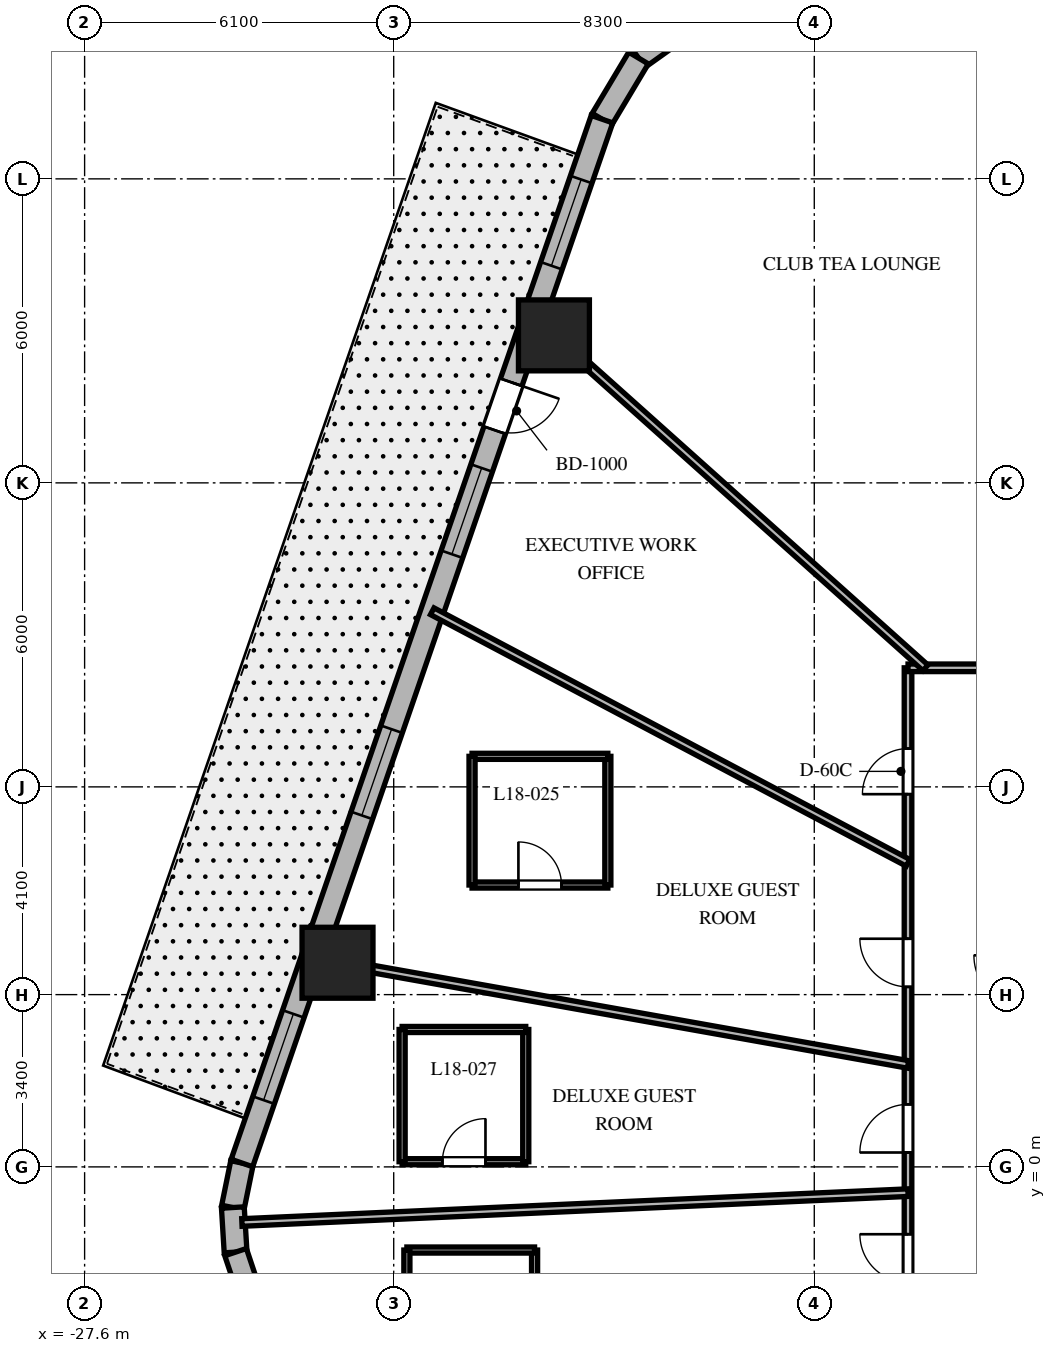
"""IFC4 building model, lengths in metres.
Left out: names, types, materials, properties, quantities, classifications, styles, units other than length and angle.
Written with IfcOpenShell. Run it as: python <this file> out.ifc"""

import sys

from ifc_helpers import new_model, si_unit, direction, frame, frame_2d, origin, origin_2d, place, context, subcontext, project, spatial, rectangle, extrude, element, fill, save


model = new_model("IFC4")
c1 = context("Model", 3, precision=1e-05, world=origin(), true_north=direction((0.0, 1.0)))
c2 = subcontext(c1, "Body", "Model", "MODEL_VIEW")
j1 = project(units=[si_unit("LENGTHUNIT", "METRE"), si_unit("PLANEANGLEUNIT", "RADIAN")], contexts=[c1])
p1 = place(None, origin())
s1 = spatial("IfcSite", under=j1, at=p1, CompositionType="ELEMENT")
p2 = place(p1, origin())
s2 = spatial("IfcBuilding", under=s1, at=p2, CompositionType="ELEMENT")
p3 = place(p2, frame((0.0, 0.0, 78.6)))
s3 = spatial("IfcBuildingStorey", under=s2, at=p3, CompositionType="ELEMENT", Elevation=78.6)
for number, where, z_axis, x_axis in (
    (1, (-18.338, 16.411, 0.0), (0.0, 0.0, 1.0), (1.0, 0.0, 0.0)),
    (2, (-22.609, 4.029, 0.0), (0.0, 0.0, 1.0), (1.0, 0.0, 0.0)),
):
    element("IfcColumn", number, at=place(p3, frame(where, z_axis=z_axis, x_axis=x_axis)), inside=s3, PredefinedType="COLUMN", context=c2, shape_type="SweptSolid", body=[
        extrude(rectangle(XDim=1.4, YDim=1.4, at=origin_2d()), origin(), (0.0, 0.0, 1.0), 3.7),
    ])
p4 = place(p3, frame((-15.544, 22.687, 0.0), z_axis=(0.0, 0.0, 1.0), x_axis=(-0.814210854316, -0.580569276412, 0.0)))
e3 = element("IfcWall", 3, at=p4, inside=s3, PredefinedType="SOLIDWALL", context=c2, shape_type="SweptSolid", body=[
    extrude(rectangle(XDim=1.381, YDim=0.45, at=frame_2d((0.691, 0.0))), origin(), (0.0, 0.0, 1.0), 3.4),
])
p5 = place(p3, frame((-16.669, 21.885, 0.0), z_axis=(0.0, 0.0, 1.0), x_axis=(-0.512936712947, -0.858426425799, 0.0)))
e4 = element("IfcWall", 4, at=p5, inside=s3, PredefinedType="SOLIDWALL", context=c2, shape_type="SweptSolid", body=[
    extrude(rectangle(XDim=1.406, YDim=0.45, at=frame_2d((0.703, 0.0))), origin(), (0.0, 0.0, 1.0), 3.4),
])
p6 = place(p3, frame((-24.496, 0.077, 0.0), z_axis=(0.0, 0.0, 1.0), x_axis=(-0.199570594521, -0.979883451132, 0.0)))
e5 = element("IfcWall", 5, at=p6, inside=s3, PredefinedType="SOLIDWALL", context=c2, shape_type="SweptSolid", body=[
    extrude(rectangle(XDim=0.897, YDim=0.45, at=frame_2d((0.448, 0.0))), origin(), (0.0, 0.0, 1.0), 3.4),
])
p7 = place(p3, frame((-24.675, -0.802, 0.0), z_axis=(0.0, 0.0, 1.0), x_axis=(0.061188874166, -0.998126205286, 0.0)))
e6 = element("IfcWall", 6, at=p7, inside=s3, PredefinedType="SOLIDWALL", context=c2, shape_type="SweptSolid", body=[
    extrude(rectangle(XDim=0.882, YDim=0.45, at=frame_2d((0.441, 0.0))), origin(), (0.0, 0.0, 1.0), 3.4),
])
p8 = place(p3, frame((-24.621, -1.682, 0.0), z_axis=(0.0, 0.0, 1.0), x_axis=(0.317697451681, -0.948192137278, 0.0)))
e7 = element("IfcWall", 7, at=p8, inside=s3, PredefinedType="SOLIDWALL", context=c2, shape_type="SweptSolid", body=[
    extrude(rectangle(XDim=0.897, YDim=0.45, at=frame_2d((0.448, 0.0))), origin(), (0.0, 0.0, 1.0), 3.4),
])
p9 = place(p3, frame((-17.39, 20.678, 0.0), z_axis=(0.0, 0.0, 1.0), x_axis=(-0.326068018294, -0.945346310854, 0.0)))
e8 = element("IfcWall", 8, at=p9, inside=s3, PredefinedType="SOLIDWALL", context=c2, shape_type="SweptSolid", body=[
    extrude(rectangle(XDim=21.793, YDim=0.45, at=frame_2d((10.896, 0.0))), origin(), (0.0, 0.0, 1.0), 3.4),
])
p10 = place(p9, frame((5.493, 0.0, 0.0)))
e9 = element("IfcOpeningElement", 9, at=p10, cuts=e8, PredefinedType="OPENING", context=c2, shape_type="SweptSolid", body=[
    extrude(rectangle(XDim=1.0, YDim=2.15, at=frame_2d((0.5, 1.075))), frame((0.0, 0.235, 0.0), z_axis=(0.0, -1.0, 0.0), x_axis=(1.0, 0.0, 0.0)), (0.0, 0.0, 1.0), 0.47),
])
p11 = place(p9, frame((1.26, 0.0, 0.8)))
e10 = element("IfcOpeningElement", 10, at=p11, cuts=e8, PredefinedType="OPENING", context=c2, shape_type="SweptSolid", body=[
    extrude(rectangle(XDim=1.8, YDim=1.8, at=frame_2d((0.9, 0.9))), frame((0.0, 0.235, 0.0), z_axis=(0.0, -1.0, 0.0), x_axis=(1.0, 0.0, 0.0)), (0.0, 0.0, 1.0), 0.47),
])
p12 = place(p9, frame((7.283, 0.0, 0.8)))
e11 = element("IfcOpeningElement", 11, at=p12, cuts=e8, PredefinedType="OPENING", context=c2, shape_type="SweptSolid", body=[
    extrude(rectangle(XDim=1.8, YDim=1.8, at=frame_2d((0.9, 0.9))), frame((0.0, 0.235, 0.0), z_axis=(0.0, -1.0, 0.0), x_axis=(1.0, 0.0, 0.0)), (0.0, 0.0, 1.0), 0.47),
])
p13 = place(p9, frame((12.736, 0.0, 0.8)))
e12 = element("IfcOpeningElement", 12, at=p13, cuts=e8, PredefinedType="OPENING", context=c2, shape_type="SweptSolid", body=[
    extrude(rectangle(XDim=1.8, YDim=1.8, at=frame_2d((0.9, 0.9))), frame((0.0, 0.235, 0.0), z_axis=(0.0, -1.0, 0.0), x_axis=(1.0, 0.0, 0.0)), (0.0, 0.0, 1.0), 0.47),
])
p14 = place(p9, frame((18.68, 0.0, 0.8)))
e13 = element("IfcOpeningElement", 13, at=p14, cuts=e8, PredefinedType="OPENING", context=c2, shape_type="SweptSolid", body=[
    extrude(rectangle(XDim=1.8, YDim=1.8, at=frame_2d((0.9, 0.9))), frame((0.0, 0.235, 0.0), z_axis=(0.0, -1.0, 0.0), x_axis=(1.0, 0.0, 0.0)), (0.0, 0.0, 1.0), 0.47),
])
p15 = place(p3, frame((-11.35, -9.85, 0.0), z_axis=(0.0, 0.0, 1.0), x_axis=(0.0, 1.0, 0.0)))
e14 = element("IfcWall", 14, at=p15, inside=s3, PredefinedType="PARTITIONING", context=c2, shape_type="SweptSolid", body=[
    extrude(rectangle(XDim=19.7, YDim=0.15, at=frame_2d((9.85, 0.0))), origin(), (0.0, 0.0, 1.0), 2.84),
])
p16 = place(p15, frame((17.206, 0.0, 0.0)))
e15 = element("IfcOpeningElement", 15, at=p16, cuts=e14, PredefinedType="OPENING", context=c2, shape_type="SweptSolid", body=[
    extrude(rectangle(XDim=0.9, YDim=2.03, at=frame_2d((0.45, 1.015))), frame((0.0, 0.085, 0.0), z_axis=(0.0, -1.0, 0.0), x_axis=(1.0, 0.0, 0.0)), (0.0, 0.0, 1.0), 0.17),
])
p17 = place(p15, frame((13.403, 0.0, 0.0)))
e16 = element("IfcOpeningElement", 16, at=p17, cuts=e14, PredefinedType="OPENING", context=c2, shape_type="SweptSolid", body=[
    extrude(rectangle(XDim=0.95, YDim=2.03, at=frame_2d((0.475, 1.015))), frame((0.0, 0.085, 0.0), z_axis=(0.0, -1.0, 0.0), x_axis=(1.0, 0.0, 0.0)), (0.0, 0.0, 1.0), 0.17),
])
p18 = place(p15, frame((10.134, 0.0, 0.0)))
e17 = element("IfcOpeningElement", 17, at=p18, cuts=e14, PredefinedType="OPENING", context=c2, shape_type="SweptSolid", body=[
    extrude(rectangle(XDim=0.95, YDim=2.03, at=frame_2d((0.475, 1.015))), frame((0.0, 0.085, 0.0), z_axis=(0.0, -1.0, 0.0), x_axis=(1.0, 0.0, 0.0)), (0.0, 0.0, 1.0), 0.17),
])
p19 = place(p15, frame((7.571, 0.0, 0.0)))
e18 = element("IfcOpeningElement", 18, at=p19, cuts=e14, PredefinedType="OPENING", context=c2, shape_type="SweptSolid", body=[
    extrude(rectangle(XDim=0.95, YDim=2.03, at=frame_2d((0.475, 1.015))), frame((0.0, 0.085, 0.0), z_axis=(0.0, -1.0, 0.0), x_axis=(1.0, 0.0, 0.0)), (0.0, 0.0, 1.0), 0.17),
])
p20 = place(p15, frame((3.024, 0.0, 0.0)))
e19 = element("IfcOpeningElement", 19, at=p20, cuts=e14, PredefinedType="OPENING", context=c2, shape_type="SweptSolid", body=[
    extrude(rectangle(XDim=0.95, YDim=2.03, at=frame_2d((0.475, 1.015))), frame((0.0, 0.085, 0.0), z_axis=(0.0, -1.0, 0.0), x_axis=(1.0, 0.0, 0.0)), (0.0, 0.0, 1.0), 0.17),
])
p21 = place(p3, frame((-11.35, 9.85, 0.0), z_axis=(0.0, 0.0, 1.0), x_axis=(1.0, 0.0, 0.0)))
e20 = element("IfcWall", 20, at=p21, inside=s3, PredefinedType="PARTITIONING", context=c2, shape_type="SweptSolid", body=[
    extrude(rectangle(XDim=22.7, YDim=0.15, at=frame_2d((11.35, 0.0))), origin(), (0.0, 0.0, 1.0), 2.84),
])
p22 = place(p21, frame((18.837, 0.0, 0.0)))
e21 = element("IfcOpeningElement", 21, at=p22, cuts=e20, PredefinedType="OPENING", context=c2, shape_type="SweptSolid", body=[
    extrude(rectangle(XDim=0.9, YDim=2.03, at=frame_2d((0.45, 1.015))), frame((0.0, 0.085, 0.0), z_axis=(0.0, -1.0, 0.0), x_axis=(1.0, 0.0, 0.0)), (0.0, 0.0, 1.0), 0.17),
])
p23 = place(p21, frame((15.532, 0.0, 0.0)))
e22 = element("IfcOpeningElement", 22, at=p23, cuts=e20, PredefinedType="OPENING", context=c2, shape_type="SweptSolid", body=[
    extrude(rectangle(XDim=0.95, YDim=2.03, at=frame_2d((0.475, 1.015))), frame((0.0, 0.085, 0.0), z_axis=(0.0, -1.0, 0.0), x_axis=(1.0, 0.0, 0.0)), (0.0, 0.0, 1.0), 0.17),
])
p24 = place(p21, frame((10.444, 0.0, 0.0)))
e23 = element("IfcOpeningElement", 23, at=p24, cuts=e20, PredefinedType="OPENING", context=c2, shape_type="SweptSolid", body=[
    extrude(rectangle(XDim=0.95, YDim=2.03, at=frame_2d((0.475, 1.015))), frame((0.0, 0.085, 0.0), z_axis=(0.0, -1.0, 0.0), x_axis=(1.0, 0.0, 0.0)), (0.0, 0.0, 1.0), 0.17),
])
p25 = place(p21, frame((3.369, 0.0, 0.0)))
e24 = element("IfcOpeningElement", 24, at=p25, cuts=e20, PredefinedType="OPENING", context=c2, shape_type="SweptSolid", body=[
    extrude(rectangle(XDim=0.95, YDim=2.03, at=frame_2d((0.475, 1.015))), frame((0.0, 0.085, 0.0), z_axis=(0.0, -1.0, 0.0), x_axis=(1.0, 0.0, 0.0)), (0.0, 0.0, 1.0), 0.17),
])
p26 = place(p3, frame((-11.007, 9.85, 0.0), z_axis=(0.0, 0.0, 1.0), x_axis=(-0.745177305978, 0.666866390407, 0.0)))
e25 = element("IfcWall", 25, at=p26, inside=s3, PredefinedType="PARTITIONING", context=c2, shape_type="SweptSolid", body=[
    extrude(rectangle(XDim=10.375, YDim=0.15, at=frame_2d((5.188, 0.0))), origin(), (0.0, 0.0, 1.0), 2.54),
])
p27 = place(p3, frame((-11.35, 6.001, 0.0), z_axis=(0.0, 0.0, 1.0), x_axis=(-0.884022077319, 0.467445148453, 0.0)))
e26 = element("IfcWall", 26, at=p27, inside=s3, PredefinedType="PARTITIONING", context=c2, shape_type="SweptSolid", body=[
    extrude(rectangle(XDim=10.621, YDim=0.15, at=frame_2d((5.311, 0.0))), origin(), (0.0, 0.0, 1.0), 2.54),
])
p28 = place(p3, frame((-11.35, 2.023, 0.0), z_axis=(0.0, 0.0, 1.0), x_axis=(-0.984493741877, 0.17541970301, 0.0)))
e27 = element("IfcWall", 27, at=p28, inside=s3, PredefinedType="PARTITIONING", context=c2, shape_type="SweptSolid", body=[
    extrude(rectangle(XDim=11.937, YDim=0.15, at=frame_2d((5.969, 0.0))), origin(), (0.0, 0.0, 1.0), 2.54),
])
p29 = place(p3, frame((-11.35, -0.508, 0.0), z_axis=(0.0, 0.0, 1.0), x_axis=(-0.998998237556, -0.044749540337, 0.0)))
e28 = element("IfcWall", 28, at=p29, inside=s3, PredefinedType="PARTITIONING", context=c2, shape_type="SweptSolid", body=[
    extrude(rectangle(XDim=13.159, YDim=0.15, at=frame_2d((6.58, 0.0))), origin(), (0.0, 0.0, 1.0), 2.54),
])
p30 = place(p3, frame((-19.954, 5.563, 0.0), z_axis=(0.0, 0.0, 1.0), x_axis=(1.0, 0.0, 0.0)))
e29 = element("IfcWall", 29, at=p30, inside=s3, PredefinedType="PARTITIONING", context=c2, shape_type="SweptSolid", body=[
    extrude(rectangle(XDim=2.68, YDim=0.12, at=frame_2d((1.34, 0.0))), origin(), (0.0, 0.0, 1.0), 2.84),
])
p31 = place(p30, frame((0.915, 0.0, 0.0)))
e30 = element("IfcOpeningElement", 30, at=p31, cuts=e29, PredefinedType="OPENING", context=c2, shape_type="SweptSolid", body=[
    extrude(rectangle(XDim=0.85, YDim=2.03, at=frame_2d((0.425, 1.015))), frame((0.0, 0.07, 0.0), z_axis=(0.0, -1.0, 0.0), x_axis=(1.0, 0.0, 0.0)), (0.0, 0.0, 1.0), 0.14),
])
p32 = place(p3, frame((-17.274, 5.563, 0.0), z_axis=(0.0, 0.0, 1.0), x_axis=(0.0, 1.0, 0.0)))
e31 = element("IfcWall", 31, at=p32, inside=s3, PredefinedType="PARTITIONING", context=c2, shape_type="SweptSolid", body=[
    extrude(rectangle(XDim=2.54, YDim=0.12, at=frame_2d((1.27, 0.0))), origin(), (0.0, 0.0, 1.0), 2.972),
])
p33 = place(p3, frame((-17.274, 8.103, 0.0), z_axis=(0.0, 0.0, 1.0), x_axis=(-1.0, 0.0, 0.0)))
e32 = element("IfcWall", 32, at=p33, inside=s3, PredefinedType="PARTITIONING", context=c2, shape_type="SweptSolid", body=[
    extrude(rectangle(XDim=2.68, YDim=0.12, at=frame_2d((1.34, 0.0))), origin(), (0.0, 0.0, 1.0), 3.4),
])
p34 = place(p3, frame((-19.954, 8.103, 0.0), z_axis=(0.0, 0.0, 1.0), x_axis=(0.0, -1.0, 0.0)))
e33 = element("IfcWall", 33, at=p34, inside=s3, PredefinedType="PARTITIONING", context=c2, shape_type="SweptSolid", body=[
    extrude(rectangle(XDim=2.54, YDim=0.12, at=frame_2d((1.27, 0.0))), origin(), (0.0, 0.0, 1.0), 3.4),
])
p35 = place(p3, frame((-21.334, 0.102, 0.0), z_axis=(0.0, 0.0, 1.0), x_axis=(1.0, 0.0, 0.0)))
e34 = element("IfcWall", 34, at=p35, inside=s3, PredefinedType="PARTITIONING", context=c2, shape_type="SweptSolid", body=[
    extrude(rectangle(XDim=2.44, YDim=0.12, at=frame_2d((1.22, 0.0))), origin(), (0.0, 0.0, 1.0), 3.4),
])
p36 = place(p35, frame((0.795, 0.0, 0.0)))
e35 = element("IfcOpeningElement", 35, at=p36, cuts=e34, PredefinedType="OPENING", context=c2, shape_type="SweptSolid", body=[
    extrude(rectangle(XDim=0.85, YDim=2.03, at=frame_2d((0.425, 1.015))), frame((0.0, 0.07, 0.0), z_axis=(0.0, -1.0, 0.0), x_axis=(1.0, 0.0, 0.0)), (0.0, 0.0, 1.0), 0.14),
])
p37 = place(p3, frame((-18.894, 0.102, 0.0), z_axis=(0.0, 0.0, 1.0), x_axis=(0.0, 1.0, 0.0)))
e36 = element("IfcWall", 36, at=p37, inside=s3, PredefinedType="PARTITIONING", context=c2, shape_type="SweptSolid", body=[
    extrude(rectangle(XDim=2.61, YDim=0.12, at=frame_2d((1.305, 0.0))), origin(), (0.0, 0.0, 1.0), 3.4),
])
p38 = place(p3, frame((-18.894, 2.712, 0.0), z_axis=(0.0, 0.0, 1.0), x_axis=(-1.0, 0.0, 0.0)))
e37 = element("IfcWall", 37, at=p38, inside=s3, PredefinedType="PARTITIONING", context=c2, shape_type="SweptSolid", body=[
    extrude(rectangle(XDim=2.44, YDim=0.12, at=frame_2d((1.22, 0.0))), origin(), (0.0, 0.0, 1.0), 3.4),
])
p39 = place(p3, frame((-21.334, 2.712, 0.0), z_axis=(0.0, 0.0, 1.0), x_axis=(0.0, -1.0, 0.0)))
e38 = element("IfcWall", 38, at=p39, inside=s3, PredefinedType="PARTITIONING", context=c2, shape_type="SweptSolid", body=[
    extrude(rectangle(XDim=2.61, YDim=0.12, at=frame_2d((1.305, 0.0))), origin(), (0.0, 0.0, 1.0), 3.4),
])
p40 = place(p3, frame((-18.72, -4.321, 0.0), z_axis=(0.0, 0.0, 1.0), x_axis=(0.0, 1.0, 0.0)))
e39 = element("IfcWall", 39, at=p40, inside=s3, PredefinedType="PARTITIONING", context=c2, shape_type="SweptSolid", body=[
    extrude(rectangle(XDim=2.68, YDim=0.12, at=frame_2d((1.34, 0.0))), origin(), (0.0, 0.0, 1.0), 3.4),
])
p41 = place(p3, frame((-18.72, -1.641, 0.0), z_axis=(0.0, 0.0, 1.0), x_axis=(-1.0, 0.0, 0.0)))
e40 = element("IfcWall", 40, at=p41, inside=s3, PredefinedType="PARTITIONING", context=c2, shape_type="SweptSolid", body=[
    extrude(rectangle(XDim=2.52, YDim=0.12, at=frame_2d((1.26, 0.0))), origin(), (0.0, 0.0, 1.0), 3.4),
])
p42 = place(p3, frame((-21.24, -1.641, 0.0), z_axis=(0.0, 0.0, 1.0), x_axis=(0.0, -1.0, 0.0)))
e41 = element("IfcWall", 41, at=p42, inside=s3, PredefinedType="PARTITIONING", context=c2, shape_type="SweptSolid", body=[
    extrude(rectangle(XDim=2.68, YDim=0.12, at=frame_2d((1.34, 0.0))), origin(), (0.0, 0.0, 1.0), 3.4),
])
p43 = place(p10, origin())
e42 = element("IfcDoor", 42, at=p43, inside=s3, OperationType="SINGLE_SWING_LEFT", PredefinedType="DOOR", context=c2, shape_type="SweptSolid", body=[
    extrude(rectangle(XDim=1.0, YDim=2.15, at=frame_2d((0.5, 1.075))), frame((0.0, 0.025, 0.0), z_axis=(0.0, -1.0, 0.0), x_axis=(1.0, 0.0, 0.0)), (0.0, 0.0, 1.0), 0.05),
])
fill(e9, e42)
p44 = place(p11, origin())
e43 = element("IfcWindow", 43, at=p44, inside=s3, PartitioningType="SINGLE_PANEL", PredefinedType="WINDOW", context=c2, shape_type="SweptSolid", body=[
    extrude(rectangle(XDim=1.8, YDim=1.8, at=frame_2d((0.9, 0.9))), frame((0.0, 0.03, 0.0), z_axis=(0.0, -1.0, 0.0), x_axis=(1.0, 0.0, 0.0)), (0.0, 0.0, 1.0), 0.06),
])
fill(e10, e43)
p45 = place(p12, origin())
e44 = element("IfcWindow", 44, at=p45, inside=s3, PartitioningType="SINGLE_PANEL", PredefinedType="WINDOW", context=c2, shape_type="SweptSolid", body=[
    extrude(rectangle(XDim=1.8, YDim=1.8, at=frame_2d((0.9, 0.9))), frame((0.0, 0.03, 0.0), z_axis=(0.0, -1.0, 0.0), x_axis=(1.0, 0.0, 0.0)), (0.0, 0.0, 1.0), 0.06),
])
fill(e11, e44)
p46 = place(p13, origin())
e45 = element("IfcWindow", 45, at=p46, inside=s3, PartitioningType="SINGLE_PANEL", PredefinedType="WINDOW", context=c2, shape_type="SweptSolid", body=[
    extrude(rectangle(XDim=1.8, YDim=1.8, at=frame_2d((0.9, 0.9))), frame((0.0, 0.03, 0.0), z_axis=(0.0, -1.0, 0.0), x_axis=(1.0, 0.0, 0.0)), (0.0, 0.0, 1.0), 0.06),
])
fill(e12, e45)
p47 = place(p14, origin())
e46 = element("IfcWindow", 46, at=p47, inside=s3, PartitioningType="SINGLE_PANEL", PredefinedType="WINDOW", context=c2, shape_type="SweptSolid", body=[
    extrude(rectangle(XDim=1.8, YDim=1.8, at=frame_2d((0.9, 0.9))), frame((0.0, 0.03, 0.0), z_axis=(0.0, -1.0, 0.0), x_axis=(1.0, 0.0, 0.0)), (0.0, 0.0, 1.0), 0.06),
])
fill(e13, e46)
p48 = place(p16, origin())
e47 = element("IfcDoor", 47, at=p48, inside=s3, OperationType="SINGLE_SWING_LEFT", PredefinedType="DOOR", context=c2, shape_type="SweptSolid", body=[
    extrude(rectangle(XDim=0.9, YDim=2.03, at=frame_2d((0.45, 1.015))), frame((0.0, 0.025, 0.0), z_axis=(0.0, -1.0, 0.0), x_axis=(1.0, 0.0, 0.0)), (0.0, 0.0, 1.0), 0.05),
])
fill(e15, e47)
p49 = place(p17, origin())
e48 = element("IfcDoor", 48, at=p49, inside=s3, OperationType="SINGLE_SWING_RIGHT", PredefinedType="DOOR", context=c2, shape_type="SweptSolid", body=[
    extrude(rectangle(XDim=0.95, YDim=2.03, at=frame_2d((0.475, 1.015))), frame((0.0, 0.025, 0.0), z_axis=(0.0, -1.0, 0.0), x_axis=(1.0, 0.0, 0.0)), (0.0, 0.0, 1.0), 0.05),
])
fill(e16, e48)
p50 = place(p31, origin())
e49 = element("IfcDoor", 49, at=p50, inside=s3, OperationType="SINGLE_SWING_LEFT", PredefinedType="DOOR", context=c2, shape_type="SweptSolid", body=[
    extrude(rectangle(XDim=0.85, YDim=2.03, at=frame_2d((0.425, 1.015))), frame((0.0, 0.025, 0.0), z_axis=(0.0, -1.0, 0.0), x_axis=(1.0, 0.0, 0.0)), (0.0, 0.0, 1.0), 0.05),
])
fill(e30, e49)
p51 = place(p18, origin())
e50 = element("IfcDoor", 50, at=p51, inside=s3, OperationType="SINGLE_SWING_LEFT", PredefinedType="DOOR", context=c2, shape_type="SweptSolid", body=[
    extrude(rectangle(XDim=0.95, YDim=2.03, at=frame_2d((0.475, 1.015))), frame((0.0, 0.025, 0.0), z_axis=(0.0, -1.0, 0.0), x_axis=(1.0, 0.0, 0.0)), (0.0, 0.0, 1.0), 0.05),
])
fill(e17, e50)
p52 = place(p36, origin())
e51 = element("IfcDoor", 51, at=p52, inside=s3, OperationType="SINGLE_SWING_RIGHT", PredefinedType="DOOR", context=c2, shape_type="SweptSolid", body=[
    extrude(rectangle(XDim=0.85, YDim=2.03, at=frame_2d((0.425, 1.015))), frame((0.0, 0.025, 0.0), z_axis=(0.0, -1.0, 0.0), x_axis=(1.0, 0.0, 0.0)), (0.0, 0.0, 1.0), 0.05),
])
fill(e35, e51)
p53 = place(p19, origin())
e52 = element("IfcDoor", 52, at=p53, inside=s3, OperationType="SINGLE_SWING_RIGHT", PredefinedType="DOOR", context=c2, shape_type="SweptSolid", body=[
    extrude(rectangle(XDim=0.95, YDim=2.03, at=frame_2d((0.475, 1.015))), frame((0.0, 0.025, 0.0), z_axis=(0.0, -1.0, 0.0), x_axis=(1.0, 0.0, 0.0)), (0.0, 0.0, 1.0), 0.05),
])
fill(e18, e52)
save(model, sys.argv[1])
